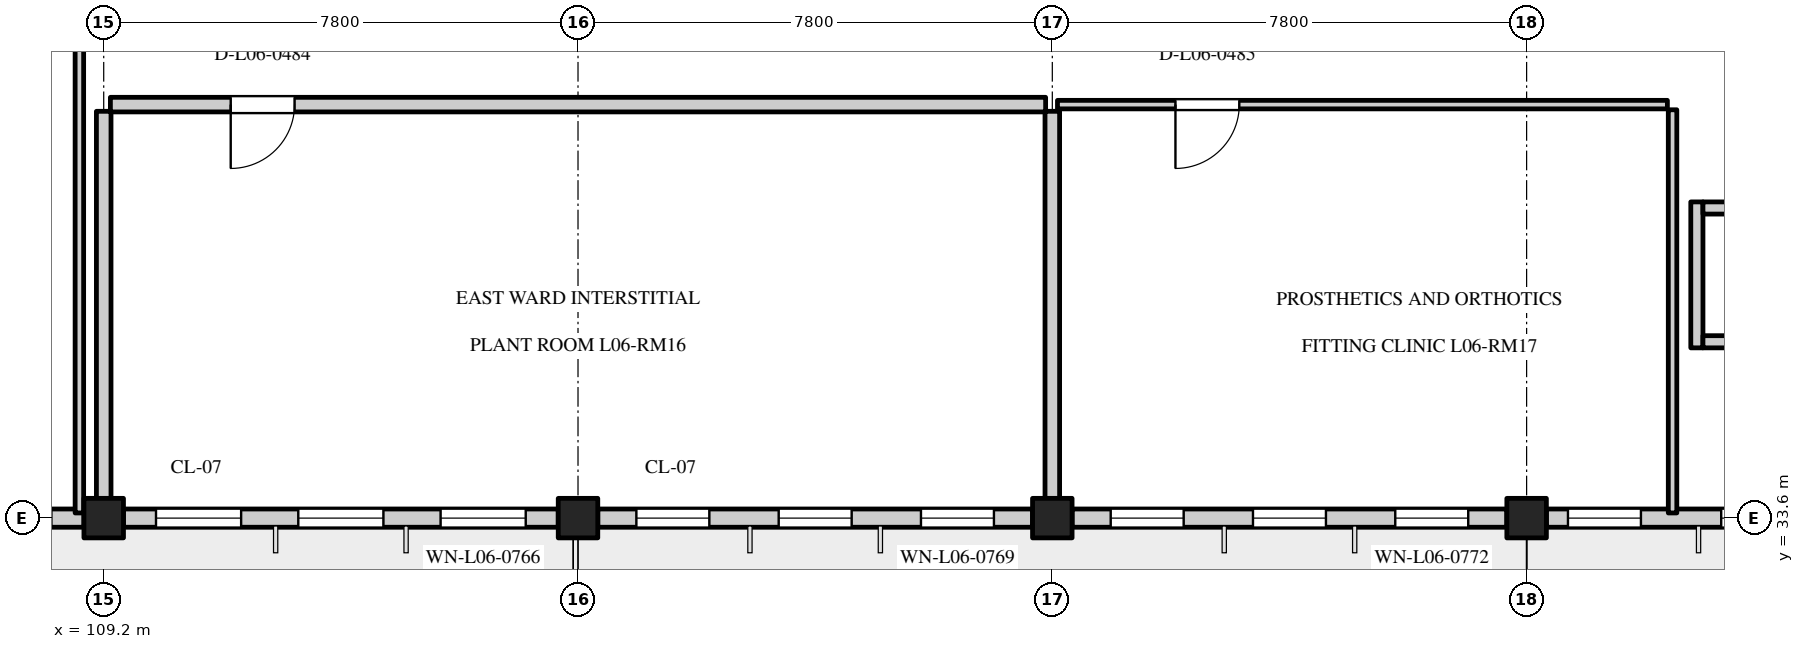
"""IFC4 building model, lengths in metres.
Left out: names, types, materials, properties, quantities, classifications, styles, units other than length and angle.
Written with IfcOpenShell. Run it as: python <this file> out.ifc"""

import sys

from ifc_helpers import new_model, si_unit, direction, frame, frame_2d, origin, origin_2d, place, context, subcontext, project, spatial, rectangle, extrude, element, fill, save


model = new_model("IFC4")
c1 = context("Model", 3, precision=1e-05, world=origin(), true_north=direction((0.0, 1.0)))
c2 = subcontext(c1, "Body", "Model", "MODEL_VIEW")
j1 = project(units=[si_unit("LENGTHUNIT", "METRE"), si_unit("PLANEANGLEUNIT", "RADIAN")], contexts=[c1])
p1 = place(None, origin())
s1 = spatial("IfcSite", under=j1, at=p1, CompositionType="ELEMENT")
p2 = place(p1, origin())
s2 = spatial("IfcBuilding", under=s1, at=p2, CompositionType="ELEMENT")
p3 = place(p2, frame((0.0, 0.0, 26.1)))
s3 = spatial("IfcBuildingStorey", under=s2, at=p3, CompositionType="ELEMENT", Elevation=26.1)
for number, where, z_axis, x_axis in (
    (1, (109.2, 33.6, 0.0), (0.0, 0.0, 1.0), (1.0, 0.0, 0.0)),
    (2, (117.0, 33.6, 0.0), (0.0, 0.0, 1.0), (1.0, 0.0, 0.0)),
    (3, (124.8, 33.6, 0.0), (0.0, 0.0, 1.0), (1.0, 0.0, 0.0)),
    (4, (132.6, 33.6, 0.0), (0.0, 0.0, 1.0), (1.0, 0.0, 0.0)),
):
    element("IfcColumn", number, at=place(p3, frame(where, z_axis=z_axis, x_axis=x_axis)), inside=s3, PredefinedType="COLUMN", context=c2, shape_type="SweptSolid", body=[
        extrude(rectangle(XDim=0.65, YDim=0.65, at=origin_2d()), origin(), (0.0, 0.0, 1.0), 3.6),
    ])
p4 = place(p3, frame((101.75, 33.6, 0.0), z_axis=(0.0, 0.0, 1.0), x_axis=(1.0, 0.0, 0.0)))
e5 = element("IfcWall", 5, at=p4, inside=s3, PredefinedType="STANDARD", context=c2, shape_type="SweptSolid", body=[
    extrude(rectangle(XDim=7.125, YDim=0.3, at=frame_2d((3.562, 0.0))), origin(), (0.0, 0.0, 1.0), 2.65),
])
p5 = place(p4, frame((0.51, 0.0, 0.8)))
e6 = element("IfcOpeningElement", 6, at=p5, cuts=e5, PredefinedType="OPENING", context=c2, shape_type="SweptSolid", body=[
    extrude(rectangle(XDim=1.4, YDim=1.6, at=frame_2d((0.7, 0.8))), frame((0.0, 0.162, 0.0), z_axis=(0.0, -1.0, 0.0), x_axis=(1.0, 0.0, 0.0)), (0.0, 0.0, 1.0), 0.324),
])
p6 = place(p4, frame((2.85, 0.0, 0.8)))
e7 = element("IfcOpeningElement", 7, at=p6, cuts=e5, PredefinedType="OPENING", context=c2, shape_type="SweptSolid", body=[
    extrude(rectangle(XDim=1.4, YDim=1.6, at=frame_2d((0.7, 0.8))), frame((0.0, 0.162, 0.0), z_axis=(0.0, -1.0, 0.0), x_axis=(1.0, 0.0, 0.0)), (0.0, 0.0, 1.0), 0.324),
])
p7 = place(p4, frame((5.19, 0.0, 0.8)))
e8 = element("IfcOpeningElement", 8, at=p7, cuts=e5, PredefinedType="OPENING", context=c2, shape_type="SweptSolid", body=[
    extrude(rectangle(XDim=1.4, YDim=1.6, at=frame_2d((0.7, 0.8))), frame((0.0, 0.162, 0.0), z_axis=(0.0, -1.0, 0.0), x_axis=(1.0, 0.0, 0.0)), (0.0, 0.0, 1.0), 0.324),
])
p8 = place(p3, frame((109.525, 33.6, 0.0), z_axis=(0.0, 0.0, 1.0), x_axis=(1.0, 0.0, 0.0)))
e9 = element("IfcWall", 9, at=p8, inside=s3, PredefinedType="STANDARD", context=c2, shape_type="SweptSolid", body=[
    extrude(rectangle(XDim=7.15, YDim=0.3, at=frame_2d((3.575, 0.0))), origin(), (0.0, 0.0, 1.0), 2.65),
])
p9 = place(p8, frame((0.535, 0.0, 0.8)))
e10 = element("IfcOpeningElement", 10, at=p9, cuts=e9, PredefinedType="OPENING", context=c2, shape_type="SweptSolid", body=[
    extrude(rectangle(XDim=1.4, YDim=1.45, at=frame_2d((0.7, 0.725))), frame((0.0, 0.162, 0.0), z_axis=(0.0, -1.0, 0.0), x_axis=(1.0, 0.0, 0.0)), (0.0, 0.0, 1.0), 0.324),
])
p10 = place(p8, frame((2.875, 0.0, 0.8)))
e11 = element("IfcOpeningElement", 11, at=p10, cuts=e9, PredefinedType="OPENING", context=c2, shape_type="SweptSolid", body=[
    extrude(rectangle(XDim=1.4, YDim=1.45, at=frame_2d((0.7, 0.725))), frame((0.0, 0.162, 0.0), z_axis=(0.0, -1.0, 0.0), x_axis=(1.0, 0.0, 0.0)), (0.0, 0.0, 1.0), 0.324),
])
p11 = place(p8, frame((5.215, 0.0, 0.8)))
e12 = element("IfcOpeningElement", 12, at=p11, cuts=e9, PredefinedType="OPENING", context=c2, shape_type="SweptSolid", body=[
    extrude(rectangle(XDim=1.4, YDim=1.45, at=frame_2d((0.7, 0.725))), frame((0.0, 0.162, 0.0), z_axis=(0.0, -1.0, 0.0), x_axis=(1.0, 0.0, 0.0)), (0.0, 0.0, 1.0), 0.324),
])
p12 = place(p3, frame((117.325, 33.6, 0.0), z_axis=(0.0, 0.0, 1.0), x_axis=(1.0, 0.0, 0.0)))
e13 = element("IfcWall", 13, at=p12, inside=s3, PredefinedType="STANDARD", context=c2, shape_type="SweptSolid", body=[
    extrude(rectangle(XDim=7.15, YDim=0.3, at=frame_2d((3.575, 0.0))), origin(), (0.0, 0.0, 1.0), 2.65),
])
p13 = place(p12, frame((0.635, 0.0, 0.8)))
e14 = element("IfcOpeningElement", 14, at=p13, cuts=e13, PredefinedType="OPENING", context=c2, shape_type="SweptSolid", body=[
    extrude(rectangle(XDim=1.2, YDim=1.55, at=frame_2d((0.6, 0.775))), frame((0.0, 0.162, 0.0), z_axis=(0.0, -1.0, 0.0), x_axis=(1.0, 0.0, 0.0)), (0.0, 0.0, 1.0), 0.324),
])
p14 = place(p12, frame((2.975, 0.0, 0.8)))
e15 = element("IfcOpeningElement", 15, at=p14, cuts=e13, PredefinedType="OPENING", context=c2, shape_type="SweptSolid", body=[
    extrude(rectangle(XDim=1.2, YDim=1.55, at=frame_2d((0.6, 0.775))), frame((0.0, 0.162, 0.0), z_axis=(0.0, -1.0, 0.0), x_axis=(1.0, 0.0, 0.0)), (0.0, 0.0, 1.0), 0.324),
])
p15 = place(p12, frame((5.315, 0.0, 0.8)))
e16 = element("IfcOpeningElement", 16, at=p15, cuts=e13, PredefinedType="OPENING", context=c2, shape_type="SweptSolid", body=[
    extrude(rectangle(XDim=1.2, YDim=1.55, at=frame_2d((0.6, 0.775))), frame((0.0, 0.162, 0.0), z_axis=(0.0, -1.0, 0.0), x_axis=(1.0, 0.0, 0.0)), (0.0, 0.0, 1.0), 0.324),
])
p16 = place(p3, frame((125.125, 33.6, 0.0), z_axis=(0.0, 0.0, 1.0), x_axis=(1.0, 0.0, 0.0)))
e17 = element("IfcWall", 17, at=p16, inside=s3, PredefinedType="STANDARD", context=c2, shape_type="SweptSolid", body=[
    extrude(rectangle(XDim=7.15, YDim=0.3, at=frame_2d((3.575, 0.0))), origin(), (0.0, 0.0, 1.0), 2.65),
])
p17 = place(p16, frame((0.635, 0.0, 0.8)))
e18 = element("IfcOpeningElement", 18, at=p17, cuts=e17, PredefinedType="OPENING", context=c2, shape_type="SweptSolid", body=[
    extrude(rectangle(XDim=1.2, YDim=1.4, at=frame_2d((0.6, 0.7))), frame((0.0, 0.162, 0.0), z_axis=(0.0, -1.0, 0.0), x_axis=(1.0, 0.0, 0.0)), (0.0, 0.0, 1.0), 0.324),
])
p18 = place(p16, frame((2.975, 0.0, 0.8)))
e19 = element("IfcOpeningElement", 19, at=p18, cuts=e17, PredefinedType="OPENING", context=c2, shape_type="SweptSolid", body=[
    extrude(rectangle(XDim=1.2, YDim=1.4, at=frame_2d((0.6, 0.7))), frame((0.0, 0.162, 0.0), z_axis=(0.0, -1.0, 0.0), x_axis=(1.0, 0.0, 0.0)), (0.0, 0.0, 1.0), 0.324),
])
p19 = place(p16, frame((5.315, 0.0, 0.8)))
e20 = element("IfcOpeningElement", 20, at=p19, cuts=e17, PredefinedType="OPENING", context=c2, shape_type="SweptSolid", body=[
    extrude(rectangle(XDim=1.2, YDim=1.4, at=frame_2d((0.6, 0.7))), frame((0.0, 0.162, 0.0), z_axis=(0.0, -1.0, 0.0), x_axis=(1.0, 0.0, 0.0)), (0.0, 0.0, 1.0), 0.324),
])
p20 = place(p3, frame((132.925, 33.6, 0.0), z_axis=(0.0, 0.0, 1.0), x_axis=(1.0, 0.0, 0.0)))
e21 = element("IfcWall", 21, at=p20, inside=s3, PredefinedType="STANDARD", context=c2, shape_type="SweptSolid", body=[
    extrude(rectangle(XDim=7.15, YDim=0.3, at=frame_2d((3.575, 0.0))), origin(), (0.0, 0.0, 1.0), 2.65),
])
p21 = place(p20, frame((0.355, 0.0, 0.8)))
e22 = element("IfcOpeningElement", 22, at=p21, cuts=e21, PredefinedType="OPENING", context=c2, shape_type="SweptSolid", body=[
    extrude(rectangle(XDim=1.2, YDim=1.55, at=frame_2d((0.6, 0.775))), frame((0.0, 0.162, 0.0), z_axis=(0.0, -1.0, 0.0), x_axis=(1.0, 0.0, 0.0)), (0.0, 0.0, 1.0), 0.324),
])
p22 = place(p20, frame((2.875, 0.0, 0.8)))
e23 = element("IfcOpeningElement", 23, at=p22, cuts=e21, PredefinedType="OPENING", context=c2, shape_type="SweptSolid", body=[
    extrude(rectangle(XDim=1.4, YDim=1.6, at=frame_2d((0.7, 0.8))), frame((0.0, 0.162, 0.0), z_axis=(0.0, -1.0, 0.0), x_axis=(1.0, 0.0, 0.0)), (0.0, 0.0, 1.0), 0.324),
])
p23 = place(p20, frame((5.215, 0.0, 0.8)))
e24 = element("IfcOpeningElement", 24, at=p23, cuts=e21, PredefinedType="OPENING", context=c2, shape_type="SweptSolid", body=[
    extrude(rectangle(XDim=1.4, YDim=1.6, at=frame_2d((0.7, 0.8))), frame((0.0, 0.162, 0.0), z_axis=(0.0, -1.0, 0.0), x_axis=(1.0, 0.0, 0.0)), (0.0, 0.0, 1.0), 0.324),
])
p24 = place(p3, frame((135.4, 36.4, 0.0), z_axis=(0.0, 0.0, 1.0), x_axis=(0.0, 1.0, 0.0)))
e25 = element("IfcWall", 25, at=p24, inside=s3, PredefinedType="STANDARD", context=c2, shape_type="SweptSolid", body=[
    extrude(rectangle(XDim=2.4, YDim=0.2, at=frame_2d((1.2, 0.0))), origin(), (0.0, 0.0, 1.0), 3.3),
])
for number, where, z_axis, x_axis in (
    (26, (135.5, 36.5, 0.0), (0.0, 0.0, 1.0), (1.0, 0.0, 0.0)),
    (27, (135.5, 38.7, 0.0), (0.0, 0.0, 1.0), (1.0, 0.0, 0.0)),
):
    element("IfcWall", number, at=place(p3, frame(where, z_axis=z_axis, x_axis=x_axis)), inside=s3, PredefinedType="STANDARD", context=c2, shape_type="SweptSolid", body=[
        extrude(rectangle(XDim=2.0, YDim=0.2, at=frame_2d((1.0, 0.0))), origin(), (0.0, 0.0, 1.0), 3.3),
    ])
p25 = place(p3, frame((108.8, 33.685, 0.0), z_axis=(0.0, 0.0, 1.0), x_axis=(0.0, 1.0, 0.0)))
e28 = element("IfcWall", 28, at=p25, inside=s3, PredefinedType="PARTITIONING", context=c2, shape_type="SweptSolid", body=[
    extrude(rectangle(XDim=11.43, YDim=0.14, at=frame_2d((5.715, 0.0))), origin(), (0.0, 0.0, 1.0), 3.28),
])
p26 = place(p3, frame((109.31, 40.4, 0.0), z_axis=(0.0, 0.0, 1.0), x_axis=(1.0, 0.0, 0.0)))
e29 = element("IfcWall", 29, at=p26, inside=s3, PredefinedType="STANDARD", context=c2, shape_type="SweptSolid", body=[
    extrude(rectangle(XDim=15.38, YDim=0.24, at=frame_2d((7.69, 0.0))), origin(), (0.0, 0.0, 1.0), 3.28),
])
p27 = place(p26, frame((1.979, 0.0, 0.0)))
e30 = element("IfcOpeningElement", 30, at=p27, cuts=e29, PredefinedType="OPENING", context=c2, shape_type="SweptSolid", body=[
    extrude(rectangle(XDim=1.05, YDim=2.1, at=frame_2d((0.525, 1.05))), frame((0.0, 0.132, 0.0), z_axis=(0.0, -1.0, 0.0), x_axis=(1.0, 0.0, 0.0)), (0.0, 0.0, 1.0), 0.264),
])
p28 = place(p3, frame((116.715, 33.6, 0.0), z_axis=(0.0, 0.0, 1.0), x_axis=(1.0, 0.0, 0.0)))
e31 = element("IfcWall", 31, at=p28, inside=s3, PredefinedType="STANDARD", context=c2, shape_type="SweptSolid", body=[
    extrude(rectangle(XDim=0.57, YDim=0.24, at=frame_2d((0.285, 0.0))), origin(), (0.0, 0.0, 1.0), 2.65),
])
p29 = place(p3, frame((109.2, 33.71, 0.0), z_axis=(0.0, 0.0, 1.0), x_axis=(0.0, 1.0, 0.0)))
e32 = element("IfcWall", 32, at=p29, inside=s3, PredefinedType="STANDARD", context=c2, shape_type="SweptSolid", body=[
    extrude(rectangle(XDim=6.58, YDim=0.24, at=frame_2d((3.29, 0.0))), origin(), (0.0, 0.0, 1.0), 3.05),
])
p30 = place(p3, frame((124.8, 33.71, 0.0), z_axis=(0.0, 0.0, 1.0), x_axis=(0.0, 1.0, 0.0)))
e33 = element("IfcWall", 33, at=p30, inside=s3, PredefinedType="STANDARD", context=c2, shape_type="SweptSolid", body=[
    extrude(rectangle(XDim=6.58, YDim=0.24, at=frame_2d((3.29, 0.0))), origin(), (0.0, 0.0, 1.0), 3.02),
])
p31 = place(p3, frame((124.885, 40.4, 0.0), z_axis=(0.0, 0.0, 1.0), x_axis=(1.0, 0.0, 0.0)))
e34 = element("IfcWall", 34, at=p31, inside=s3, PredefinedType="PARTITIONING", context=c2, shape_type="SweptSolid", body=[
    extrude(rectangle(XDim=10.03, YDim=0.14, at=frame_2d((5.015, 0.0))), origin(), (0.0, 0.0, 1.0), 3.28),
])
p32 = place(p31, frame((1.94, 0.0, 0.0)))
e35 = element("IfcOpeningElement", 35, at=p32, cuts=e34, PredefinedType="OPENING", context=c2, shape_type="SweptSolid", body=[
    extrude(rectangle(XDim=1.05, YDim=2.1, at=frame_2d((0.525, 1.05))), frame((0.0, 0.082, 0.0), z_axis=(0.0, -1.0, 0.0), x_axis=(1.0, 0.0, 0.0)), (0.0, 0.0, 1.0), 0.164),
])
p33 = place(p3, frame((132.315, 33.6, 0.0), z_axis=(0.0, 0.0, 1.0), x_axis=(1.0, 0.0, 0.0)))
e36 = element("IfcWall", 36, at=p33, inside=s3, PredefinedType="PARTITIONING", context=c2, shape_type="SweptSolid", body=[
    extrude(rectangle(XDim=0.57, YDim=0.14, at=frame_2d((0.285, 0.0))), origin(), (0.0, 0.0, 1.0), 2.65),
])
p34 = place(p3, frame((135.0, 33.685, 0.0), z_axis=(0.0, 0.0, 1.0), x_axis=(0.0, 1.0, 0.0)))
e37 = element("IfcWall", 37, at=p34, inside=s3, PredefinedType="PARTITIONING", context=c2, shape_type="SweptSolid", body=[
    extrude(rectangle(XDim=6.63, YDim=0.14, at=frame_2d((3.315, 0.0))), origin(), (0.0, 0.0, 1.0), 3.28),
])
p35 = place(p9, origin())
e38 = element("IfcWindow", 38, at=p35, inside=s3, PartitioningType="SINGLE_PANEL", PredefinedType="WINDOW", context=c2, shape_type="SweptSolid", body=[
    extrude(rectangle(XDim=1.4, YDim=1.45, at=frame_2d((0.7, 0.725))), frame((0.0, 0.03, 0.0), z_axis=(0.0, -1.0, 0.0), x_axis=(1.0, 0.0, 0.0)), (0.0, 0.0, 1.0), 0.06),
])
fill(e10, e38)
p36 = place(p10, origin())
e39 = element("IfcWindow", 39, at=p36, inside=s3, PartitioningType="SINGLE_PANEL", PredefinedType="WINDOW", context=c2, shape_type="SweptSolid", body=[
    extrude(rectangle(XDim=1.4, YDim=1.45, at=frame_2d((0.7, 0.725))), frame((0.0, 0.03, 0.0), z_axis=(0.0, -1.0, 0.0), x_axis=(1.0, 0.0, 0.0)), (0.0, 0.0, 1.0), 0.06),
])
fill(e11, e39)
p37 = place(p11, origin())
e40 = element("IfcWindow", 40, at=p37, inside=s3, PartitioningType="SINGLE_PANEL", PredefinedType="WINDOW", context=c2, shape_type="SweptSolid", body=[
    extrude(rectangle(XDim=1.4, YDim=1.45, at=frame_2d((0.7, 0.725))), frame((0.0, 0.03, 0.0), z_axis=(0.0, -1.0, 0.0), x_axis=(1.0, 0.0, 0.0)), (0.0, 0.0, 1.0), 0.06),
])
fill(e12, e40)
p38 = place(p13, origin())
e41 = element("IfcWindow", 41, at=p38, inside=s3, PartitioningType="SINGLE_PANEL", PredefinedType="WINDOW", context=c2, shape_type="SweptSolid", body=[
    extrude(rectangle(XDim=1.2, YDim=1.55, at=frame_2d((0.6, 0.775))), frame((0.0, 0.03, 0.0), z_axis=(0.0, -1.0, 0.0), x_axis=(1.0, 0.0, 0.0)), (0.0, 0.0, 1.0), 0.06),
])
fill(e14, e41)
p39 = place(p14, origin())
e42 = element("IfcWindow", 42, at=p39, inside=s3, PartitioningType="SINGLE_PANEL", PredefinedType="WINDOW", context=c2, shape_type="SweptSolid", body=[
    extrude(rectangle(XDim=1.2, YDim=1.55, at=frame_2d((0.6, 0.775))), frame((0.0, 0.03, 0.0), z_axis=(0.0, -1.0, 0.0), x_axis=(1.0, 0.0, 0.0)), (0.0, 0.0, 1.0), 0.06),
])
fill(e15, e42)
p40 = place(p15, origin())
e43 = element("IfcWindow", 43, at=p40, inside=s3, PartitioningType="SINGLE_PANEL", PredefinedType="WINDOW", context=c2, shape_type="SweptSolid", body=[
    extrude(rectangle(XDim=1.2, YDim=1.55, at=frame_2d((0.6, 0.775))), frame((0.0, 0.03, 0.0), z_axis=(0.0, -1.0, 0.0), x_axis=(1.0, 0.0, 0.0)), (0.0, 0.0, 1.0), 0.06),
])
fill(e16, e43)
p41 = place(p17, origin())
e44 = element("IfcWindow", 44, at=p41, inside=s3, PartitioningType="SINGLE_PANEL", PredefinedType="WINDOW", context=c2, shape_type="SweptSolid", body=[
    extrude(rectangle(XDim=1.2, YDim=1.4, at=frame_2d((0.6, 0.7))), frame((0.0, 0.03, 0.0), z_axis=(0.0, -1.0, 0.0), x_axis=(1.0, 0.0, 0.0)), (0.0, 0.0, 1.0), 0.06),
])
fill(e18, e44)
p42 = place(p18, origin())
e45 = element("IfcWindow", 45, at=p42, inside=s3, PartitioningType="SINGLE_PANEL", PredefinedType="WINDOW", context=c2, shape_type="SweptSolid", body=[
    extrude(rectangle(XDim=1.2, YDim=1.4, at=frame_2d((0.6, 0.7))), frame((0.0, 0.03, 0.0), z_axis=(0.0, -1.0, 0.0), x_axis=(1.0, 0.0, 0.0)), (0.0, 0.0, 1.0), 0.06),
])
fill(e19, e45)
p43 = place(p19, origin())
e46 = element("IfcWindow", 46, at=p43, inside=s3, PartitioningType="SINGLE_PANEL", PredefinedType="WINDOW", context=c2, shape_type="SweptSolid", body=[
    extrude(rectangle(XDim=1.2, YDim=1.4, at=frame_2d((0.6, 0.7))), frame((0.0, 0.03, 0.0), z_axis=(0.0, -1.0, 0.0), x_axis=(1.0, 0.0, 0.0)), (0.0, 0.0, 1.0), 0.06),
])
fill(e20, e46)
p44 = place(p21, origin())
e47 = element("IfcWindow", 47, at=p44, inside=s3, PartitioningType="SINGLE_PANEL", PredefinedType="WINDOW", context=c2, shape_type="SweptSolid", body=[
    extrude(rectangle(XDim=1.2, YDim=1.55, at=frame_2d((0.6, 0.775))), frame((0.0, 0.03, 0.0), z_axis=(0.0, -1.0, 0.0), x_axis=(1.0, 0.0, 0.0)), (0.0, 0.0, 1.0), 0.06),
])
fill(e22, e47)
p45 = place(p22, origin())
e48 = element("IfcWindow", 48, at=p45, inside=s3, PartitioningType="SINGLE_PANEL", PredefinedType="WINDOW", context=c2, shape_type="SweptSolid", body=[
    extrude(rectangle(XDim=1.4, YDim=1.6, at=frame_2d((0.7, 0.8))), frame((0.0, 0.03, 0.0), z_axis=(0.0, -1.0, 0.0), x_axis=(1.0, 0.0, 0.0)), (0.0, 0.0, 1.0), 0.06),
])
fill(e23, e48)
p46 = place(p27, frame((1.05, 0.0, 0.0), z_axis=(0.0, 0.0, 1.0), x_axis=(-1.0, 0.0, 0.0)))
e49 = element("IfcDoor", 49, at=p46, inside=s3, OperationType="SINGLE_SWING_RIGHT", PredefinedType="DOOR", context=c2, shape_type="SweptSolid", body=[
    extrude(rectangle(XDim=1.05, YDim=2.1, at=frame_2d((0.525, 1.05))), frame((0.0, 0.025, 0.0), z_axis=(0.0, -1.0, 0.0), x_axis=(1.0, 0.0, 0.0)), (0.0, 0.0, 1.0), 0.05),
])
fill(e30, e49)
p47 = place(p32, frame((1.05, 0.0, 0.0), z_axis=(0.0, 0.0, 1.0), x_axis=(-1.0, 0.0, 0.0)))
e50 = element("IfcDoor", 50, at=p47, inside=s3, OperationType="SINGLE_SWING_RIGHT", PredefinedType="DOOR", context=c2, shape_type="SweptSolid", body=[
    extrude(rectangle(XDim=1.05, YDim=2.1, at=frame_2d((0.525, 1.05))), frame((0.0, 0.025, 0.0), z_axis=(0.0, -1.0, 0.0), x_axis=(1.0, 0.0, 0.0)), (0.0, 0.0, 1.0), 0.05),
])
fill(e35, e50)
save(model, sys.argv[1])
